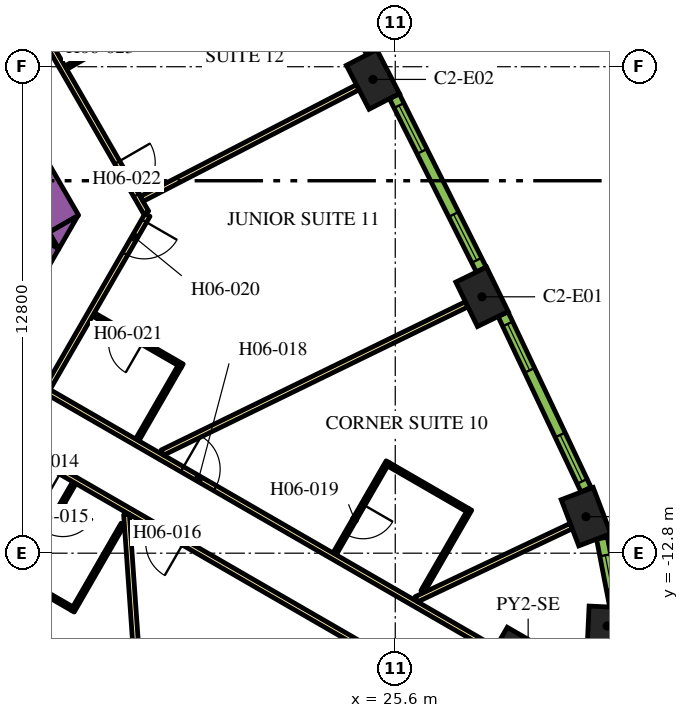
"""IFC4 building model, lengths in metres.
Left out: names, types, materials, properties, quantities, classifications, styles, units other than length and angle.
Written with IfcOpenShell. Run it as: python <this file> out.ifc"""

import sys

from ifc_helpers import new_model, si_unit, direction, frame, frame_2d, origin, origin_2d, place, context, subcontext, project, spatial, polyline, rectangle, outline, extrude, element, fill, save


model = new_model("IFC4")
c1 = context("Model", 3, precision=1e-05, world=origin(), true_north=direction((0.0, 1.0)))
c2 = subcontext(c1, "Body", "Model", "MODEL_VIEW")
j1 = project(units=[si_unit("LENGTHUNIT", "METRE"), si_unit("PLANEANGLEUNIT", "RADIAN")], contexts=[c1])
p1 = place(None, origin())
s1 = spatial("IfcSite", under=j1, at=p1, CompositionType="ELEMENT")
p2 = place(p1, origin())
s2 = spatial("IfcBuilding", under=s1, at=p2, CompositionType="ELEMENT")
p3 = place(p2, frame((0.0, 0.0, 91.5)))
s3 = spatial("IfcBuildingStorey", under=s2, at=p3, CompositionType="ELEMENT", Elevation=91.5)
p4 = place(p3, frame((29.097, -16.799, 0.0), z_axis=(0.0, 0.0, 1.0), x_axis=(0.866025403784, -0.5, 0.0)))
e1 = element("IfcColumn", 1, at=p4, inside=s3, PredefinedType="COLUMN", context=c2, shape_type="SweptSolid", body=[
    extrude(rectangle(XDim=3.0, YDim=3.0, at=origin_2d()), origin(), (0.0, 0.0, 1.0), 3.9),
])
p5 = place(p3, frame((31.177, -14.714, 0.0), z_axis=(0.0, 0.0, 1.0), x_axis=(0.046756026083, 0.998906338965, 0.0)))
e2 = element("IfcColumn", 2, at=p5, inside=s3, PredefinedType="COLUMN", context=c2, shape_type="SweptSolid", body=[
    extrude(rectangle(XDim=1.0, YDim=1.0, at=origin_2d()), origin(), (0.0, 0.0, 1.0), 3.9),
])
for number, where, z_axis, x_axis in (
    (3, (30.619, -11.839, 0.0), (0.0, 0.0, 1.0), (-0.355, 0.935, 0.0)),
    (4, (27.883, -6.054, 0.0), (0.0, 0.0, 1.0), (-0.438, 0.899, 0.0)),
    (5, (25.012, -0.334, 0.0), (0.0, 0.0, 1.0), (-0.459, 0.888, 0.0)),
):
    element("IfcColumn", number, at=place(p3, frame(where, z_axis=z_axis, x_axis=x_axis)), inside=s3, PredefinedType="COLUMN", context=c2, shape_type="SweptSolid", body=[
        extrude(rectangle(XDim=1.3, YDim=0.9, at=origin_2d()), origin(), (0.0, 0.0, 1.0), 3.9),
    ])
p6 = place(p3, frame((6.776, 13.364, 0.0), z_axis=(0.0, 0.0, 1.0), x_axis=(0.500004177138, -0.8660229921, 0.0)))
e6 = element("IfcWall", 6, at=p6, inside=s3, PredefinedType="SOLIDWALL", context=c2, shape_type="SweptSolid", body=[
    extrude(rectangle(XDim=20.204, YDim=0.9, at=frame_2d((10.102, 0.0))), origin(), (0.0, 0.0, 1.0), 3.9),
])
p7 = place(p3, origin())
e7 = element("IfcWall", 7, at=p7, inside=s3, PredefinedType="SOLIDWALL", context=c2, shape_type="SweptSolid", body=[
    extrude(outline(polyline([(16.743, -4.8), (16.489, -4.36), (17.251, -3.92), (16.743, -4.8)])), origin(), (0.0, 0.0, 1.0), 3.9),
])
p8 = place(p3, frame((11.695, -12.644, 0.0), z_axis=(0.0, 0.0, 1.0), x_axis=(0.500010229568, 0.86601949766, 0.0)))
e8 = element("IfcWall", 8, at=p8, inside=s3, PredefinedType="SOLIDWALL", context=c2, shape_type="SweptSolid", body=[
    extrude(rectangle(XDim=9.326, YDim=0.9, at=frame_2d((4.663, 0.0))), origin(), (0.0, 0.0, 1.0), 3.9),
])
e9 = element("IfcWall", 9, at=p7, inside=s3, PredefinedType="SOLIDWALL", context=c2, shape_type="SweptSolid", body=[
    extrude(outline(polyline([(16.223, -3.9), (16.732, -4.78), (15.969, -4.34), (16.223, -3.9)])), origin(), (0.0, 0.0, 1.0), 3.9),
])
p9 = place(p3, frame((16.412, -8.523, 0.0), z_axis=(0.0, 0.0, 1.0), x_axis=(0.866025629663, -0.499999608766, 0.0)))
e10 = element("IfcWall", 10, at=p9, inside=s3, PredefinedType="PARTITIONING", context=c2, shape_type="SweptSolid", body=[
    extrude(rectangle(XDim=13.624, YDim=0.15, at=frame_2d((6.812, 0.0))), origin(), (0.0, 0.0, 1.0), 2.75),
])
p10 = place(p9, frame((4.134, 0.0, 0.0)))
e11 = element("IfcOpeningElement", 11, at=p10, cuts=e10, PredefinedType="OPENING", context=c2, shape_type="SweptSolid", body=[
    extrude(rectangle(XDim=1.0, YDim=2.1, at=frame_2d((0.5, 1.05))), frame((0.0, 0.085, 0.0), z_axis=(0.0, -1.0, 0.0), x_axis=(1.0, 0.0, 0.0)), (0.0, 0.0, 1.0), 0.17),
])
p11 = place(p3, frame((19.081, -3.9, 0.0), z_axis=(0.0, 0.0, 1.0), x_axis=(-0.499974327079, -0.866040225545, 0.0)))
e12 = element("IfcWall", 12, at=p11, inside=s3, PredefinedType="PARTITIONING", context=c2, shape_type="SweptSolid", body=[
    extrude(rectangle(XDim=5.258, YDim=0.15, at=frame_2d((2.629, 0.0))), origin(), (0.0, 0.0, 1.0), 2.75),
])
p12 = place(p11, frame((0.18, 0.0, 0.0)))
e13 = element("IfcOpeningElement", 13, at=p12, cuts=e12, PredefinedType="OPENING", context=c2, shape_type="SweptSolid", body=[
    extrude(rectangle(XDim=1.0, YDim=2.1, at=frame_2d((0.5, 1.05))), frame((0.0, 0.085, 0.0), z_axis=(0.0, -1.0, 0.0), x_axis=(1.0, 0.0, 0.0)), (0.0, 0.0, 1.0), 0.17),
])
p13 = place(p3, frame((6.163, 18.475, 0.0), z_axis=(0.0, 0.0, 1.0), x_axis=(0.500001317485, -0.866024643133, 0.0)))
e14 = element("IfcWall", 14, at=p13, inside=s3, PredefinedType="PARTITIONING", context=c2, shape_type="SweptSolid", body=[
    extrude(rectangle(XDim=25.767, YDim=0.15, at=frame_2d((12.883, 0.0))), origin(), (0.0, 0.0, 1.0), 2.75),
])
p14 = place(p13, frame((24.241, 0.0, 0.0)))
e15 = element("IfcOpeningElement", 15, at=p14, cuts=e14, PredefinedType="OPENING", context=c2, shape_type="SweptSolid", body=[
    extrude(rectangle(XDim=1.0, YDim=2.1, at=frame_2d((0.5, 1.05))), frame((0.0, 0.085, 0.0), z_axis=(0.0, -1.0, 0.0), x_axis=(1.0, 0.0, 0.0)), (0.0, 0.0, 1.0), 0.17),
])
p15 = place(p13, frame((13.144, 0.0, 0.0)))
e16 = element("IfcOpeningElement", 16, at=p15, cuts=e14, PredefinedType="OPENING", context=c2, shape_type="SweptSolid", body=[
    extrude(rectangle(XDim=1.0, YDim=2.1, at=frame_2d((0.5, 1.05))), frame((0.0, 0.085, 0.0), z_axis=(0.0, -1.0, 0.0), x_axis=(1.0, 0.0, 0.0)), (0.0, 0.0, 1.0), 0.17),
])
p16 = place(p13, frame((10.874, 0.0, 0.0)))
e17 = element("IfcOpeningElement", 17, at=p16, cuts=e14, PredefinedType="OPENING", context=c2, shape_type="SweptSolid", body=[
    extrude(rectangle(XDim=0.9, YDim=2.1, at=frame_2d((0.45, 1.05))), frame((0.0, 0.085, 0.0), z_axis=(0.0, -1.0, 0.0), x_axis=(1.0, 0.0, 0.0)), (0.0, 0.0, 1.0), 0.17),
])
p17 = place(p13, frame((3.718, 0.0, 0.0)))
e18 = element("IfcOpeningElement", 18, at=p17, cuts=e14, PredefinedType="OPENING", context=c2, shape_type="SweptSolid", body=[
    extrude(rectangle(XDim=1.1, YDim=2.1, at=frame_2d((0.55, 1.05))), frame((0.0, 0.085, 0.0), z_axis=(0.0, -1.0, 0.0), x_axis=(1.0, 0.0, 0.0)), (0.0, 0.0, 1.0), 0.17),
])
p18 = place(p13, frame((2.411, 0.0, 0.0)))
e19 = element("IfcOpeningElement", 19, at=p18, cuts=e14, PredefinedType="OPENING", context=c2, shape_type="SweptSolid", body=[
    extrude(rectangle(XDim=1.0, YDim=2.1, at=frame_2d((0.5, 1.05))), frame((0.0, 0.085, 0.0), z_axis=(0.0, -1.0, 0.0), x_axis=(1.0, 0.0, 0.0)), (0.0, 0.0, 1.0), 0.17),
])
p19 = place(p3, frame((27.386, -16.764, 0.0), z_axis=(0.0, 0.0, 1.0), x_axis=(-0.866022585856, 0.500004880763, 0.0)))
e20 = element("IfcWall", 20, at=p19, inside=s3, PredefinedType="PARTITIONING", context=c2, shape_type="SweptSolid", body=[
    extrude(rectangle(XDim=13.544, YDim=0.15, at=frame_2d((6.772, 0.0))), origin(), (0.0, 0.0, 1.0), 2.75),
])
p20 = place(p19, frame((12.214, 0.0, 0.0)))
e21 = element("IfcOpeningElement", 21, at=p20, cuts=e20, PredefinedType="OPENING", context=c2, shape_type="SweptSolid", body=[
    extrude(rectangle(XDim=1.0, YDim=2.1, at=frame_2d((0.5, 1.05))), frame((0.0, 0.085, 0.0), z_axis=(0.0, -1.0, 0.0), x_axis=(1.0, 0.0, 0.0)), (0.0, 0.0, 1.0), 0.17),
])
p21 = place(p19, frame((8.49, 0.0, 0.0)))
e22 = element("IfcOpeningElement", 22, at=p21, cuts=e20, PredefinedType="OPENING", context=c2, shape_type="SweptSolid", body=[
    extrude(rectangle(XDim=1.0, YDim=2.1, at=frame_2d((0.5, 1.05))), frame((0.0, 0.085, 0.0), z_axis=(0.0, -1.0, 0.0), x_axis=(1.0, 0.0, 0.0)), (0.0, 0.0, 1.0), 0.17),
])
p22 = place(p3, frame((19.153, -20.671, 0.0), z_axis=(0.0, 0.0, 1.0), x_axis=(-0.070070736723, 0.997542025107, 0.0)))
e23 = element("IfcWall", 23, at=p22, inside=s3, PredefinedType="PARTITIONING", context=c2, shape_type="SweptSolid", body=[
    extrude(rectangle(XDim=8.909, YDim=0.15, at=frame_2d((4.455, 0.0))), origin(), (0.0, 0.0, 1.0), 2.75),
])
p23 = place(p3, frame((24.613, -0.541, 0.0), z_axis=(0.0, 0.0, 1.0), x_axis=(-0.888459912519, -0.458954228487, 0.0)))
e24 = element("IfcWall", 24, at=p23, inside=s3, PredefinedType="PARTITIONING", context=c2, shape_type="SweptSolid", body=[
    extrude(rectangle(XDim=6.392, YDim=0.15, at=frame_2d((3.196, 0.0))), origin(), (0.0, 0.0, 1.0), 2.75),
])
p24 = place(p3, frame((27.479, -6.251, 0.0), z_axis=(0.0, 0.0, 1.0), x_axis=(-0.898945877276, -0.438059710231, 0.0)))
e25 = element("IfcWall", 25, at=p24, inside=s3, PredefinedType="PARTITIONING", context=c2, shape_type="SweptSolid", body=[
    extrude(rectangle(XDim=8.909, YDim=0.15, at=frame_2d((4.455, 0.0))), origin(), (0.0, 0.0, 1.0), 2.75),
])
p25 = place(p3, frame((30.231, -12.085, 0.0), z_axis=(0.0, 0.0, 1.0), x_axis=(-0.904001132572, -0.427530060122, 0.0)))
e26 = element("IfcWall", 26, at=p25, inside=s3, PredefinedType="PARTITIONING", context=c2, shape_type="SweptSolid", body=[
    extrude(rectangle(XDim=4.51, YDim=0.15, at=frame_2d((2.255, 0.0))), origin(), (0.0, 0.0, 1.0), 2.75),
])
p26 = place(p3, frame((17.155, -10.944, 0.0), z_axis=(0.0, 0.0, 1.0), x_axis=(-0.499939757307, -0.866060182126, 0.0)))
e27 = element("IfcWall", 27, at=p26, inside=s3, PredefinedType="PARTITIONING", context=c2, shape_type="SweptSolid", body=[
    extrude(rectangle(XDim=2.95, YDim=0.1, at=frame_2d((1.475, 0.0))), origin(), (0.0, 0.0, 1.0), 2.75),
])
p27 = place(p26, frame((0.6, 0.0, 0.0)))
e28 = element("IfcOpeningElement", 28, at=p27, cuts=e27, PredefinedType="OPENING", context=c2, shape_type="SweptSolid", body=[
    extrude(rectangle(XDim=0.9, YDim=2.1, at=frame_2d((0.45, 1.05))), frame((0.0, 0.06, 0.0), z_axis=(0.0, -1.0, 0.0), x_axis=(1.0, 0.0, 0.0)), (0.0, 0.0, 1.0), 0.12),
])
p28 = place(p3, frame((15.748, -13.48, 0.0), z_axis=(0.0, 0.0, 1.0), x_axis=(0.866083307622, -0.499899694197, 0.0)))
e29 = element("IfcWall", 29, at=p28, inside=s3, PredefinedType="PARTITIONING", context=c2, shape_type="SweptSolid", body=[
    extrude(rectangle(XDim=1.55, YDim=0.1, at=frame_2d((0.775, 0.0))), origin(), (0.0, 0.0, 1.0), 2.75),
])
p29 = place(p3, frame((18.429, -12.037, 0.0), z_axis=(0.0, 0.0, 1.0), x_axis=(-0.500007957085, -0.86602080971, 0.0)))
e30 = element("IfcWall", 30, at=p29, inside=s3, PredefinedType="PARTITIONING", context=c2, shape_type="SweptSolid", body=[
    extrude(rectangle(XDim=2.64, YDim=0.1, at=frame_2d((1.32, 0.0))), origin(), (0.0, 0.0, 1.0), 2.75),
])
p30 = place(p3, frame((25.404, -10.395, 0.0), z_axis=(0.0, 0.0, 1.0), x_axis=(-0.500011755427, -0.866018616679, 0.0)))
e31 = element("IfcWall", 31, at=p30, inside=s3, PredefinedType="PARTITIONING", context=c2, shape_type="SweptSolid", body=[
    extrude(rectangle(XDim=2.8, YDim=0.1, at=frame_2d((1.4, 0.0))), origin(), (0.0, 0.0, 1.0), 2.75),
])
p31 = place(p30, frame((1.3, 0.0, 0.0)))
e32 = element("IfcOpeningElement", 32, at=p31, cuts=e31, PredefinedType="OPENING", context=c2, shape_type="SweptSolid", body=[
    extrude(rectangle(XDim=0.9, YDim=2.1, at=frame_2d((0.45, 1.05))), frame((0.0, 0.06, 0.0), z_axis=(0.0, -1.0, 0.0), x_axis=(1.0, 0.0, 0.0)), (0.0, 0.0, 1.0), 0.12),
])
p32 = place(p3, frame((25.422, -10.463, 0.0), z_axis=(0.0, 0.0, 1.0), x_axis=(0.866024647952, -0.500001309137, 0.0)))
e33 = element("IfcWall", 33, at=p32, inside=s3, PredefinedType="PARTITIONING", context=c2, shape_type="SweptSolid", body=[
    extrude(rectangle(XDim=2.4, YDim=0.1, at=frame_2d((1.2, 0.0))), origin(), (0.0, 0.0, 1.0), 2.75),
])
p33 = place(p3, frame((26.319, -13.81, 0.0), z_axis=(0.0, 0.0, 1.0), x_axis=(0.499961950354, 0.866047370643, 0.0)))
e34 = element("IfcWall", 34, at=p33, inside=s3, PredefinedType="PARTITIONING", context=c2, shape_type="SweptSolid", body=[
    extrude(rectangle(XDim=2.5, YDim=0.1, at=frame_2d((1.25, 0.0))), origin(), (0.0, 0.0, 1.0), 2.75),
])
p34 = place(p3, frame((19.996, -7.867, 0.0), z_axis=(0.0, 0.0, 1.0), x_axis=(-0.866019956843, 0.50000943426, 0.0)))
e35 = element("IfcWall", 35, at=p34, inside=s3, PredefinedType="PARTITIONING", context=c2, shape_type="SweptSolid", body=[
    extrude(rectangle(XDim=2.7, YDim=0.1, at=frame_2d((1.35, 0.0))), origin(), (0.0, 0.0, 1.0), 2.75),
])
p35 = place(p34, frame((1.2, 0.0, 0.0)))
e36 = element("IfcOpeningElement", 36, at=p35, cuts=e35, PredefinedType="OPENING", context=c2, shape_type="SweptSolid", body=[
    extrude(rectangle(XDim=0.9, YDim=2.1, at=frame_2d((0.45, 1.05))), frame((0.0, 0.06, 0.0), z_axis=(0.0, -1.0, 0.0), x_axis=(1.0, 0.0, 0.0)), (0.0, 0.0, 1.0), 0.12),
])
p36 = place(p3, frame((19.922, -7.894, 0.0), z_axis=(0.0, 0.0, 1.0), x_axis=(-0.499995378973, -0.866028071719, 0.0)))
e37 = element("IfcWall", 37, at=p36, inside=s3, PredefinedType="PARTITIONING", context=c2, shape_type="SweptSolid", body=[
    extrude(rectangle(XDim=2.22, YDim=0.1, at=frame_2d((1.11, 0.0))), origin(), (0.0, 0.0, 1.0), 2.75),
])
p37 = place(p3, frame((16.931, -0.026, 0.0), z_axis=(0.0, 0.0, 1.0), x_axis=(0.866059108428, 0.4999416173, 0.0)))
e38 = element("IfcWall", 38, at=p37, inside=s3, PredefinedType="PARTITIONING", context=c2, shape_type="SweptSolid", body=[
    extrude(rectangle(XDim=2.7, YDim=0.1, at=frame_2d((1.35, 0.0))), origin(), (0.0, 0.0, 1.0), 2.75),
])
p38 = place(p37, frame((0.6, 0.0, 0.0)))
e39 = element("IfcOpeningElement", 39, at=p38, cuts=e38, PredefinedType="OPENING", context=c2, shape_type="SweptSolid", body=[
    extrude(rectangle(XDim=0.9, YDim=2.1, at=frame_2d((0.45, 1.05))), frame((0.0, 0.06, 0.0), z_axis=(0.0, -1.0, 0.0), x_axis=(1.0, 0.0, 0.0)), (0.0, 0.0, 1.0), 0.12),
])
p39 = place(p3, frame((31.385, -14.189, 0.0), z_axis=(0.0, 0.0, 1.0), x_axis=(-0.190409913989, 0.981704672829, 0.0)))
e40 = element("IfcWall", 40, at=p39, inside=s3, PredefinedType="SOLIDWALL", context=c2, shape_type="SweptSolid", body=[
    extrude(rectangle(XDim=1.819, YDim=0.29, at=frame_2d((0.91, 0.0))), origin(), (0.0, 0.0, 1.0), 3.65),
])
p40 = place(p39, frame((0.46, 0.0, 0.9)))
e41 = element("IfcOpeningElement", 41, at=p40, cuts=e40, PredefinedType="OPENING", context=c2, shape_type="SweptSolid", body=[
    extrude(rectangle(XDim=0.9, YDim=2.15, at=frame_2d((0.45, 1.075))), frame((0.0, 0.155, 0.0), z_axis=(0.0, -1.0, 0.0), x_axis=(1.0, 0.0, 0.0)), (0.0, 0.0, 1.0), 0.31),
])
p41 = place(p3, frame((30.62, -11.127, 0.0), z_axis=(0.0, 0.0, 1.0), x_axis=(-0.427543726596, 0.903994669148, 0.0)))
e42 = element("IfcWall", 42, at=p41, inside=s3, PredefinedType="SOLIDWALL", context=c2, shape_type="SweptSolid", body=[
    extrude(rectangle(XDim=5.107, YDim=0.29, at=frame_2d((2.553, 0.0))), origin(), (0.0, 0.0, 1.0), 3.65),
])
p42 = place(p41, frame((0.24, 0.0, 0.9)))
e43 = element("IfcOpeningElement", 43, at=p42, cuts=e42, PredefinedType="OPENING", context=c2, shape_type="SweptSolid", body=[
    extrude(rectangle(XDim=1.35, YDim=2.15, at=frame_2d((0.675, 1.075))), frame((0.0, 0.155, 0.0), z_axis=(0.0, -1.0, 0.0), x_axis=(1.0, 0.0, 0.0)), (0.0, 0.0, 1.0), 0.31),
])
p43 = place(p41, frame((3.471, 0.0, 0.9)))
e44 = element("IfcOpeningElement", 44, at=p43, cuts=e42, PredefinedType="OPENING", context=c2, shape_type="SweptSolid", body=[
    extrude(rectangle(XDim=1.35, YDim=2.15, at=frame_2d((0.675, 1.075))), frame((0.0, 0.155, 0.0), z_axis=(0.0, -1.0, 0.0), x_axis=(1.0, 0.0, 0.0)), (0.0, 0.0, 1.0), 0.31),
])
p44 = place(p3, frame((27.864, -5.336, 0.0), z_axis=(0.0, 0.0, 1.0), x_axis=(-0.448534297211, 0.893765620409, 0.0)))
e45 = element("IfcWall", 45, at=p44, inside=s3, PredefinedType="SOLIDWALL", context=c2, shape_type="SweptSolid", body=[
    extrude(rectangle(XDim=5.1, YDim=0.29, at=frame_2d((2.55, 0.0))), origin(), (0.0, 0.0, 1.0), 3.65),
])
p45 = place(p44, frame((0.272, 0.0, 0.9)))
e46 = element("IfcOpeningElement", 46, at=p45, cuts=e45, PredefinedType="OPENING", context=c2, shape_type="SweptSolid", body=[
    extrude(rectangle(XDim=1.35, YDim=2.15, at=frame_2d((0.675, 1.075))), frame((0.0, 0.155, 0.0), z_axis=(0.0, -1.0, 0.0), x_axis=(1.0, 0.0, 0.0)), (0.0, 0.0, 1.0), 0.31),
])
p46 = place(p44, frame((3.478, 0.0, 0.9)))
e47 = element("IfcOpeningElement", 47, at=p46, cuts=e45, PredefinedType="OPENING", context=c2, shape_type="SweptSolid", body=[
    extrude(rectangle(XDim=1.35, YDim=2.15, at=frame_2d((0.675, 1.075))), frame((0.0, 0.155, 0.0), z_axis=(0.0, -1.0, 0.0), x_axis=(1.0, 0.0, 0.0)), (0.0, 0.0, 1.0), 0.31),
])
p47 = place(p3, frame((24.977, 0.383, 0.0), z_axis=(0.0, 0.0, 1.0), x_axis=(-0.469323203119, 0.883026461106, 0.0)))
e48 = element("IfcWall", 48, at=p47, inside=s3, PredefinedType="SOLIDWALL", context=c2, shape_type="SweptSolid", body=[
    extrude(rectangle(XDim=5.101, YDim=0.29, at=frame_2d((2.55, 0.0))), origin(), (0.0, 0.0, 1.0), 3.65),
])
p48 = place(p47, frame((0.273, 0.0, 0.9)))
e49 = element("IfcOpeningElement", 49, at=p48, cuts=e48, PredefinedType="OPENING", context=c2, shape_type="SweptSolid", body=[
    extrude(rectangle(XDim=1.35, YDim=2.15, at=frame_2d((0.675, 1.075))), frame((0.0, 0.155, 0.0), z_axis=(0.0, -1.0, 0.0), x_axis=(1.0, 0.0, 0.0)), (0.0, 0.0, 1.0), 0.31),
])
p49 = place(p47, frame((3.478, 0.0, 0.9)))
e50 = element("IfcOpeningElement", 50, at=p49, cuts=e48, PredefinedType="OPENING", context=c2, shape_type="SweptSolid", body=[
    extrude(rectangle(XDim=1.35, YDim=2.15, at=frame_2d((0.675, 1.075))), frame((0.0, 0.155, 0.0), z_axis=(0.0, -1.0, 0.0), x_axis=(1.0, 0.0, 0.0)), (0.0, 0.0, 1.0), 0.31),
])
p50 = place(p20, origin())
e51 = element("IfcDoor", 51, at=p50, inside=s3, OperationType="SINGLE_SWING_RIGHT", PredefinedType="DOOR", context=c2, shape_type="SweptSolid", body=[
    extrude(rectangle(XDim=1.0, YDim=2.1, at=frame_2d((0.5, 1.05))), frame((0.0, 0.025, 0.0), z_axis=(0.0, -1.0, 0.0), x_axis=(1.0, 0.0, 0.0)), (0.0, 0.0, 1.0), 0.05),
])
fill(e21, e51)
p51 = place(p27, origin())
e52 = element("IfcDoor", 52, at=p51, inside=s3, OperationType="SINGLE_SWING_LEFT", PredefinedType="DOOR", context=c2, shape_type="SweptSolid", body=[
    extrude(rectangle(XDim=0.9, YDim=2.1, at=frame_2d((0.45, 1.05))), frame((0.0, 0.025, 0.0), z_axis=(0.0, -1.0, 0.0), x_axis=(1.0, 0.0, 0.0)), (0.0, 0.0, 1.0), 0.05),
])
fill(e28, e52)
p52 = place(p21, origin())
e53 = element("IfcDoor", 53, at=p52, inside=s3, OperationType="SINGLE_SWING_RIGHT", PredefinedType="DOOR", context=c2, shape_type="SweptSolid", body=[
    extrude(rectangle(XDim=1.0, YDim=2.1, at=frame_2d((0.5, 1.05))), frame((0.0, 0.025, 0.0), z_axis=(0.0, -1.0, 0.0), x_axis=(1.0, 0.0, 0.0)), (0.0, 0.0, 1.0), 0.05),
])
fill(e22, e53)
p53 = place(p10, origin())
e54 = element("IfcDoor", 54, at=p53, inside=s3, OperationType="SINGLE_SWING_LEFT", PredefinedType="DOOR", context=c2, shape_type="SweptSolid", body=[
    extrude(rectangle(XDim=1.0, YDim=2.1, at=frame_2d((0.5, 1.05))), frame((0.0, 0.025, 0.0), z_axis=(0.0, -1.0, 0.0), x_axis=(1.0, 0.0, 0.0)), (0.0, 0.0, 1.0), 0.05),
])
fill(e11, e54)
p54 = place(p31, origin())
e55 = element("IfcDoor", 55, at=p54, inside=s3, OperationType="SINGLE_SWING_LEFT", PredefinedType="DOOR", context=c2, shape_type="SweptSolid", body=[
    extrude(rectangle(XDim=0.9, YDim=2.1, at=frame_2d((0.45, 1.05))), frame((0.0, 0.025, 0.0), z_axis=(0.0, -1.0, 0.0), x_axis=(1.0, 0.0, 0.0)), (0.0, 0.0, 1.0), 0.05),
])
fill(e32, e55)
p55 = place(p12, origin())
e56 = element("IfcDoor", 56, at=p55, inside=s3, OperationType="SINGLE_SWING_LEFT", PredefinedType="DOOR", context=c2, shape_type="SweptSolid", body=[
    extrude(rectangle(XDim=1.0, YDim=2.1, at=frame_2d((0.5, 1.05))), frame((0.0, 0.025, 0.0), z_axis=(0.0, -1.0, 0.0), x_axis=(1.0, 0.0, 0.0)), (0.0, 0.0, 1.0), 0.05),
])
fill(e13, e56)
p56 = place(p35, origin())
e57 = element("IfcDoor", 57, at=p56, inside=s3, OperationType="SINGLE_SWING_LEFT", PredefinedType="DOOR", context=c2, shape_type="SweptSolid", body=[
    extrude(rectangle(XDim=0.9, YDim=2.1, at=frame_2d((0.45, 1.05))), frame((0.0, 0.025, 0.0), z_axis=(0.0, -1.0, 0.0), x_axis=(1.0, 0.0, 0.0)), (0.0, 0.0, 1.0), 0.05),
])
fill(e36, e57)
p57 = place(p14, origin())
e58 = element("IfcDoor", 58, at=p57, inside=s3, OperationType="SINGLE_SWING_RIGHT", PredefinedType="DOOR", context=c2, shape_type="SweptSolid", body=[
    extrude(rectangle(XDim=1.0, YDim=2.1, at=frame_2d((0.5, 1.05))), frame((0.0, 0.025, 0.0), z_axis=(0.0, -1.0, 0.0), x_axis=(1.0, 0.0, 0.0)), (0.0, 0.0, 1.0), 0.05),
])
fill(e15, e58)
p58 = place(p38, origin())
e59 = element("IfcDoor", 59, at=p58, inside=s3, OperationType="SINGLE_SWING_RIGHT", PredefinedType="DOOR", context=c2, shape_type="SweptSolid", body=[
    extrude(rectangle(XDim=0.9, YDim=2.1, at=frame_2d((0.45, 1.05))), frame((0.0, 0.025, 0.0), z_axis=(0.0, -1.0, 0.0), x_axis=(1.0, 0.0, 0.0)), (0.0, 0.0, 1.0), 0.05),
])
fill(e39, e59)
p59 = place(p40, origin())
e60 = element("IfcWindow", 60, at=p59, inside=s3, PartitioningType="SINGLE_PANEL", PredefinedType="WINDOW", context=c2, shape_type="SweptSolid", body=[
    extrude(rectangle(XDim=0.9, YDim=2.15, at=frame_2d((0.45, 1.075))), frame((0.0, 0.015, 0.0), z_axis=(0.0, -1.0, 0.0), x_axis=(1.0, 0.0, 0.0)), (0.0, 0.0, 1.0), 0.06),
])
fill(e41, e60)
p60 = place(p42, origin())
e61 = element("IfcWindow", 61, at=p60, inside=s3, PartitioningType="DOUBLE_PANEL_VERTICAL", PredefinedType="WINDOW", context=c2, shape_type="SweptSolid", body=[
    extrude(rectangle(XDim=1.35, YDim=2.15, at=frame_2d((0.675, 1.075))), frame((0.0, 0.015, 0.0), z_axis=(0.0, -1.0, 0.0), x_axis=(1.0, 0.0, 0.0)), (0.0, 0.0, 1.0), 0.06),
])
fill(e43, e61)
p61 = place(p43, origin())
e62 = element("IfcWindow", 62, at=p61, inside=s3, PartitioningType="DOUBLE_PANEL_VERTICAL", PredefinedType="WINDOW", context=c2, shape_type="SweptSolid", body=[
    extrude(rectangle(XDim=1.35, YDim=2.15, at=frame_2d((0.675, 1.075))), frame((0.0, 0.015, 0.0), z_axis=(0.0, -1.0, 0.0), x_axis=(1.0, 0.0, 0.0)), (0.0, 0.0, 1.0), 0.06),
])
fill(e44, e62)
p62 = place(p45, origin())
e63 = element("IfcWindow", 63, at=p62, inside=s3, PartitioningType="DOUBLE_PANEL_VERTICAL", PredefinedType="WINDOW", context=c2, shape_type="SweptSolid", body=[
    extrude(rectangle(XDim=1.35, YDim=2.15, at=frame_2d((0.675, 1.075))), frame((0.0, 0.015, 0.0), z_axis=(0.0, -1.0, 0.0), x_axis=(1.0, 0.0, 0.0)), (0.0, 0.0, 1.0), 0.06),
])
fill(e46, e63)
p63 = place(p46, origin())
e64 = element("IfcWindow", 64, at=p63, inside=s3, PartitioningType="DOUBLE_PANEL_VERTICAL", PredefinedType="WINDOW", context=c2, shape_type="SweptSolid", body=[
    extrude(rectangle(XDim=1.35, YDim=2.15, at=frame_2d((0.675, 1.075))), frame((0.0, 0.015, 0.0), z_axis=(0.0, -1.0, 0.0), x_axis=(1.0, 0.0, 0.0)), (0.0, 0.0, 1.0), 0.06),
])
fill(e47, e64)
save(model, sys.argv[1])
